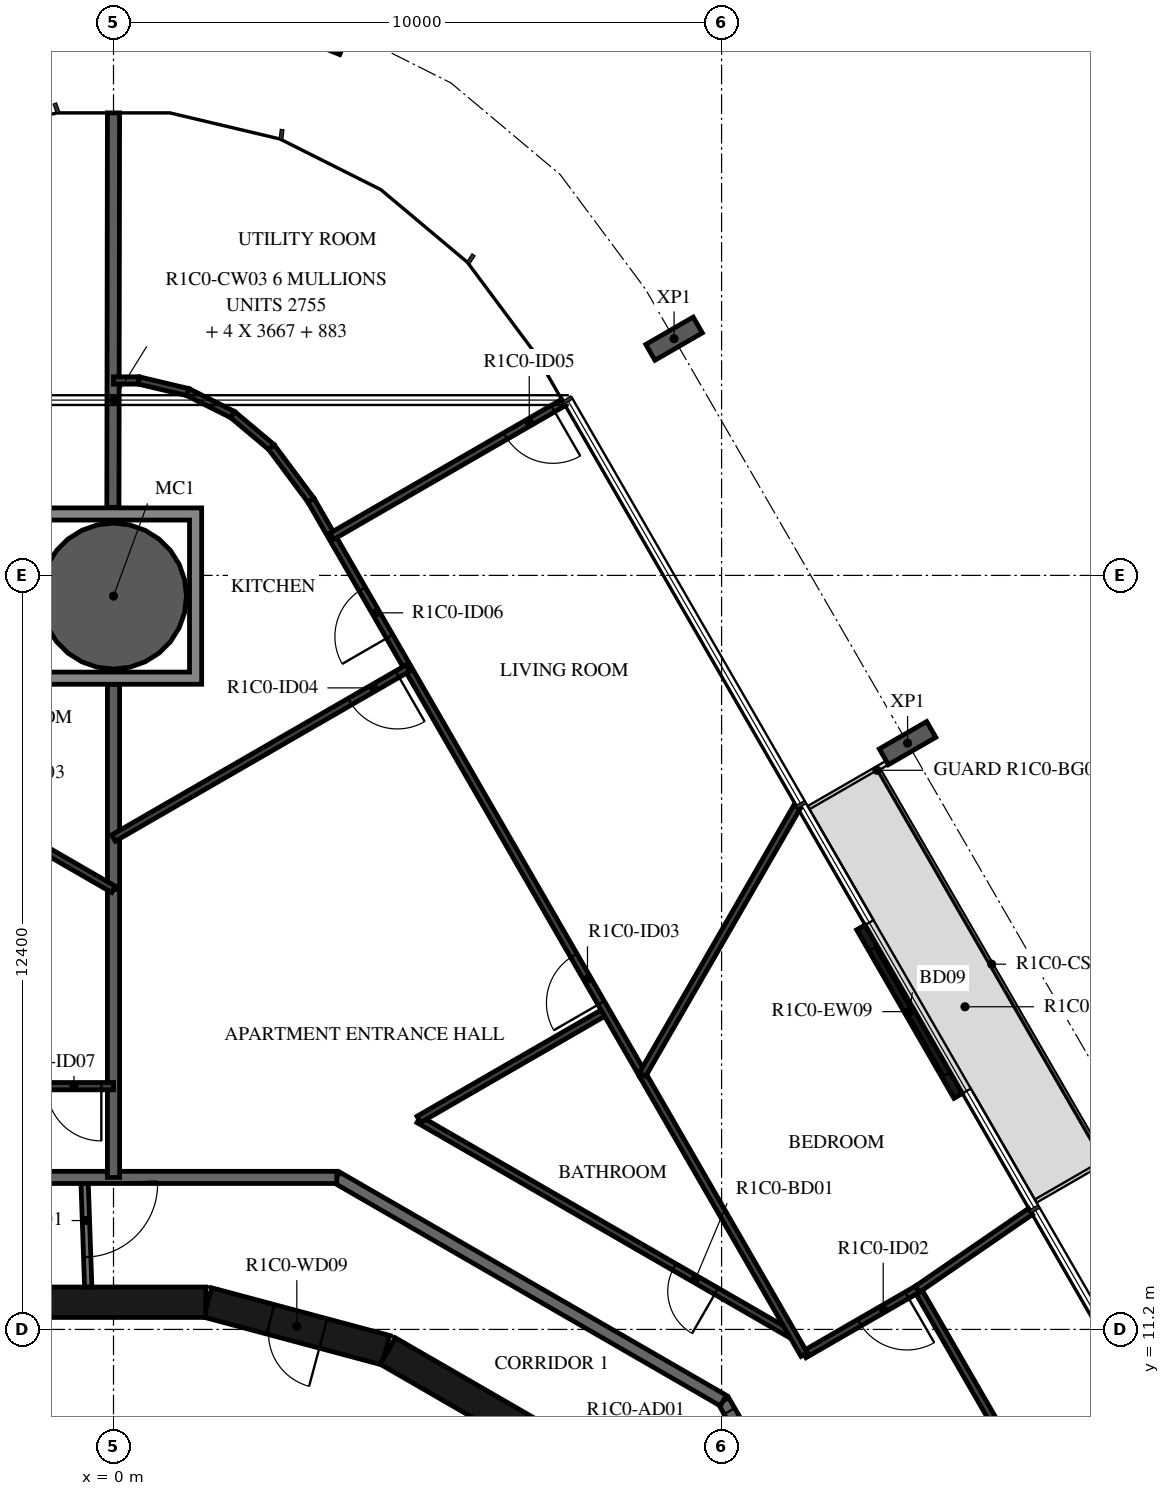
"""IFC4 building model, lengths in metres.
Left out: names, types, materials, properties, quantities, classifications, styles, units other than length and angle.
Written with IfcOpenShell. Run it as: python <this file> out.ifc"""

import sys

from ifc_helpers import new_model, si_unit, direction, frame, frame_2d, origin, origin_2d, place, context, subcontext, project, spatial, polyline, rectangle, hollow_circle, i_section, outline, extrude, element, fill, save


model = new_model("IFC4")
c1 = context("Model", 3, precision=1e-05, world=origin(), true_north=direction((0.0, 1.0)))
c2 = subcontext(c1, "Body", "Model", "MODEL_VIEW")
j1 = project(units=[si_unit("LENGTHUNIT", "METRE"), si_unit("PLANEANGLEUNIT", "RADIAN")], contexts=[c1])
p1 = place(None, origin())
s1 = spatial("IfcSite", under=j1, at=p1, CompositionType="ELEMENT")
p2 = place(p1, origin())
s2 = spatial("IfcBuilding", under=s1, at=p2, CompositionType="ELEMENT")
p3 = place(p2, frame((0.0, 0.0, 59.4)))
s3 = spatial("IfcBuildingStorey", under=s2, at=p3, CompositionType="ELEMENT", Elevation=59.4)
p4 = place(p3, frame((0.0, 23.26, -0.38), z_axis=(0.0, 0.0, 1.0), x_axis=(1.0, 0.0, 0.0)))
e1 = element("IfcColumn", 1, at=p4, inside=s3, PredefinedType="COLUMN", context=c2, shape_type="SweptSolid", body=[
    extrude(hollow_circle(Radius=1.2, WallThickness=0.06, at=origin_2d()), origin(), (0.0, 0.0, 1.0), 3.5),
])
for number, where, z_axis, x_axis in (
    (2, (13.059, 20.842, -0.38), (0.0, 0.0, 1.0), (0.5, -0.866, 0.0)),
    (3, (9.219, 27.493, -0.38), (0.0, 0.0, 1.0), (0.5, -0.866, 0.0)),
    (4, (3.748, 32.639, -0.38), (0.0, 0.0, 1.0), (0.929, -0.371, 0.0)),
):
    element("IfcColumn", number, at=place(p3, frame(where, z_axis=z_axis, x_axis=x_axis)), inside=s3, PredefinedType="COLUMN", context=c2, shape_type="SweptSolid", body=[
        extrude(i_section(OverallWidth=0.3, OverallDepth=0.9, WebThickness=0.019, FlangeThickness=0.035, FilletRadius=0.03, at=origin_2d()), origin(), (0.0, 0.0, 1.0), 3.5),
    ])
p5 = place(p3, frame((13.891, 15.041, 0.0), z_axis=(0.0, 0.0, 1.0), x_axis=(-0.499971222258, 0.866042017984, 0.0)))
e5 = element("IfcWall", 5, at=p5, inside=s3, PredefinedType="STANDARD", context=c2, shape_type="SweptSolid", body=[
    extrude(rectangle(XDim=3.2, YDim=0.16, at=frame_2d((1.6, 0.0))), origin(), (0.0, 0.0, 1.0), 3.12),
])
p6 = place(p5, frame((0.4, 0.0, 0.0)))
e6 = element("IfcOpeningElement", 6, at=p6, cuts=e5, PredefinedType="OPENING", context=c2, shape_type="SweptSolid", body=[
    extrude(rectangle(XDim=2.4, YDim=2.4, at=frame_2d((1.2, 1.2))), frame((0.0, 0.09, 0.0), z_axis=(0.0, -1.0, 0.0), x_axis=(1.0, 0.0, 0.0)), (0.0, 0.0, 1.0), 0.18),
])
p7 = place(p3, frame((7.137, 9.329, 0.0), z_axis=(0.0, 0.0, 1.0), x_axis=(-0.865975092491, 0.500087131594, 0.0)))
e7 = element("IfcWall", 7, at=p7, inside=s3, PredefinedType="SHEAR", context=c2, shape_type="SweptSolid", body=[
    extrude(rectangle(XDim=3.033, YDim=0.5, at=frame_2d((1.516, 0.0))), origin(), (0.0, 0.0, 1.0), 3.12),
])
p8 = place(p3, frame((4.479, 10.858, 0.0), z_axis=(0.0, 0.0, 1.0), x_axis=(-0.965948410781, 0.258734743916, 0.0)))
e8 = element("IfcWall", 8, at=p8, inside=s3, PredefinedType="SHEAR", context=c2, shape_type="SweptSolid", body=[
    extrude(rectangle(XDim=3.033, YDim=0.5, at=frame_2d((1.516, 0.0))), origin(), (0.0, 0.0, 1.0), 3.12),
])
p9 = place(p8, frame((1.066, 0.0, 0.0)))
e9 = element("IfcOpeningElement", 9, at=p9, cuts=e8, PredefinedType="OPENING", context=c2, shape_type="SweptSolid", body=[
    extrude(rectangle(XDim=0.9, YDim=2.1, at=frame_2d((0.45, 1.05))), frame((0.0, 0.26, 0.0), z_axis=(0.0, -1.0, 0.0), x_axis=(1.0, 0.0, 0.0)), (0.0, 0.0, 1.0), 0.52),
])
p10 = place(p3, frame((1.516, 11.647, 0.0), z_axis=(0.0, 0.0, 1.0), x_axis=(-1.0, 0.0, 0.0)))
e10 = element("IfcWall", 10, at=p10, inside=s3, PredefinedType="SHEAR", context=c2, shape_type="SweptSolid", body=[
    extrude(rectangle(XDim=3.033, YDim=0.5, at=frame_2d((1.516, 0.0))), origin(), (0.0, 0.0, 1.0), 3.12),
])
p11 = place(p3, frame((-0.479, 13.7, 0.0), z_axis=(0.0, 0.0, 1.0), x_axis=(0.034919103017, -0.999390142159, 0.0)))
e11 = element("IfcWall", 11, at=p11, inside=s3, PredefinedType="PARTITIONING", context=c2, shape_type="SweptSolid", body=[
    extrude(rectangle(XDim=1.804, YDim=0.12, at=frame_2d((0.902, 0.0))), origin(), (0.0, 0.0, 1.0), 3.12),
])
p12 = place(p11, frame((0.11, 0.0, 0.0)))
e12 = element("IfcOpeningElement", 12, at=p12, cuts=e11, PredefinedType="OPENING", context=c2, shape_type="SweptSolid", body=[
    extrude(rectangle(XDim=1.2, YDim=2.1, at=frame_2d((0.6, 1.05))), frame((0.0, 0.07, 0.0), z_axis=(0.0, -1.0, 0.0), x_axis=(1.0, 0.0, 0.0)), (0.0, 0.0, 1.0), 0.14),
])
p13 = place(p3, frame((13.7, 3.671, 0.0), z_axis=(0.0, 0.0, 1.0), x_axis=(-0.500001669485, 0.866024439905, 0.0)))
e13 = element("IfcWall", 13, at=p13, inside=s3, PredefinedType="STANDARD", context=c2, shape_type="SweptSolid", body=[
    extrude(rectangle(XDim=7.342, YDim=0.2, at=frame_2d((3.671, 0.0))), origin(), (0.0, 0.0, 1.0), 3.12),
])
p14 = place(p13, frame((6.142, 0.0, 0.0)))
e14 = element("IfcOpeningElement", 14, at=p14, cuts=e13, PredefinedType="OPENING", context=c2, shape_type="SweptSolid", body=[
    extrude(rectangle(XDim=1.0, YDim=2.1, at=frame_2d((0.5, 1.05))), frame((0.0, 0.11, 0.0), z_axis=(0.0, -1.0, 0.0), x_axis=(1.0, 0.0, 0.0)), (0.0, 0.0, 1.0), 0.22),
])
for number, where, z_axis, x_axis in (
    (15, (10.029, 10.029, 0.0), (0.0, 0.0, 1.0), (-0.866, 0.5, 0.0)),
    (16, (3.671, 13.7, 0.0), (0.0, 0.0, 1.0), (-1.0, 0.0, 0.0)),
):
    element("IfcWall", number, at=place(p3, frame(where, z_axis=z_axis, x_axis=x_axis)), inside=s3, PredefinedType="STANDARD", context=c2, shape_type="SweptSolid", body=[
        extrude(rectangle(XDim=7.342, YDim=0.2, at=frame_2d((3.671, 0.0))), origin(), (0.0, 0.0, 1.0), 3.12),
    ])
p15 = place(p3, frame((0.0, 18.437, 0.0), z_axis=(0.0, 0.0, 1.0), x_axis=(0.0, -1.0, 0.0)))
e17 = element("IfcWall", 17, at=p15, inside=s3, PredefinedType="STANDARD", context=c2, shape_type="SweptSolid", body=[
    extrude(rectangle(XDim=4.737, YDim=0.2, at=frame_2d((2.368, 0.0))), origin(), (0.0, 0.0, 1.0), 3.12),
])
p16 = place(p3, frame((0.0, 21.81, 0.0), z_axis=(0.0, 0.0, 1.0), x_axis=(0.0, -1.0, 0.0)))
e18 = element("IfcWall", 18, at=p16, inside=s3, PredefinedType="STANDARD", context=c2, shape_type="SweptSolid", body=[
    extrude(rectangle(XDim=3.373, YDim=0.2, at=frame_2d((1.687, 0.0))), origin(), (0.0, 0.0, 1.0), 3.12),
])
p17 = place(p3, frame((0.0, 31.206, 0.0), z_axis=(0.0, 0.0, 1.0), x_axis=(-0.001543266126, -0.999998809164, 0.0)))
e19 = element("IfcWall", 19, at=p17, inside=s3, PredefinedType="STANDARD", context=c2, shape_type="SweptSolid", body=[
    extrude(rectangle(XDim=6.486, YDim=0.2, at=frame_2d((3.243, 0.0))), origin(), (0.0, 0.0, 1.0), 3.12),
])
p18 = place(p3, frame((14.471, 9.697, 0.0), z_axis=(0.0, 0.0, 1.0), x_axis=(-0.500004234368, 0.866022959057, 0.0)))
e20 = element("IfcWall", 20, at=p18, inside=s3, PredefinedType="PARTITIONING", context=c2, shape_type="SweptSolid", body=[
    extrude(rectangle(XDim=2.5, YDim=0.12, at=frame_2d((1.25, 0.0))), origin(), (0.0, 0.0, 1.0), 3.12),
])
p19 = place(p3, frame((13.221, 11.862, 0.0), z_axis=(0.0, 0.0, 1.0), x_axis=(-0.866055151781, -0.499948471418, 0.0)))
e21 = element("IfcWall", 21, at=p19, inside=s3, PredefinedType="PARTITIONING", context=c2, shape_type="SweptSolid", body=[
    extrude(rectangle(XDim=2.151, YDim=0.12, at=frame_2d((1.075, 0.0))), origin(), (0.0, 0.0, 1.0), 3.12),
])
p20 = place(p19, frame((0.2, 0.0, 0.0)))
e22 = element("IfcOpeningElement", 22, at=p20, cuts=e21, PredefinedType="OPENING", context=c2, shape_type="SweptSolid", body=[
    extrude(rectangle(XDim=0.9, YDim=2.1, at=frame_2d((0.45, 1.05))), frame((0.0, 0.07, 0.0), z_axis=(0.0, -1.0, 0.0), x_axis=(1.0, 0.0, 0.0)), (0.0, 0.0, 1.0), 0.14),
])
p21 = place(p3, frame((11.127, 11.127, 0.0), z_axis=(0.0, 0.0, 1.0), x_axis=(-0.86602299963, 0.500004164094, 0.0)))
e23 = element("IfcWall", 23, at=p21, inside=s3, PredefinedType="PARTITIONING", context=c2, shape_type="SweptSolid", body=[
    extrude(rectangle(XDim=7.052, YDim=0.12, at=frame_2d((3.526, 0.0))), origin(), (0.0, 0.0, 1.0), 3.12),
])
p22 = place(p21, frame((1.4, 0.0, 0.0)))
e24 = element("IfcOpeningElement", 24, at=p22, cuts=e23, PredefinedType="OPENING", context=c2, shape_type="SweptSolid", body=[
    extrude(rectangle(XDim=0.8, YDim=2.1, at=frame_2d((0.4, 1.05))), frame((0.0, 0.07, 0.0), z_axis=(0.0, -1.0, 0.0), x_axis=(1.0, 0.0, 0.0)), (0.0, 0.0, 1.0), 0.14),
])
p23 = place(p3, frame((5.02, 14.653, 0.0), z_axis=(0.0, 0.0, 1.0), x_axis=(0.866028940167, 0.499993874756, 0.0)))
e25 = element("IfcWall", 25, at=p23, inside=s3, PredefinedType="PARTITIONING", context=c2, shape_type="SweptSolid", body=[
    extrude(rectangle(XDim=3.556, YDim=0.12, at=frame_2d((1.778, 0.0))), origin(), (0.0, 0.0, 1.0), 3.12),
])
p24 = place(p3, frame((8.7, 15.392, 0.0), z_axis=(0.0, 0.0, 1.0), x_axis=(-0.500002742713, 0.866023820272, 0.0)))
e26 = element("IfcWall", 26, at=p24, inside=s3, PredefinedType="PARTITIONING", context=c2, shape_type="SweptSolid", body=[
    extrude(rectangle(XDim=10.908, YDim=0.12, at=frame_2d((5.454, 0.0))), origin(), (0.0, 0.0, 1.0), 3.12),
])
p25 = place(p24, frame((1.36, 0.0, 0.0)))
e27 = element("IfcOpeningElement", 27, at=p25, cuts=e26, PredefinedType="OPENING", context=c2, shape_type="SweptSolid", body=[
    extrude(rectangle(XDim=0.9, YDim=2.1, at=frame_2d((0.45, 1.05))), frame((0.0, 0.07, 0.0), z_axis=(0.0, -1.0, 0.0), x_axis=(1.0, 0.0, 0.0)), (0.0, 0.0, 1.0), 0.14),
])
p26 = place(p24, frame((8.317, 0.0, 0.0)))
e28 = element("IfcOpeningElement", 28, at=p26, cuts=e26, PredefinedType="OPENING", context=c2, shape_type="SweptSolid", body=[
    extrude(rectangle(XDim=0.9, YDim=2.1, at=frame_2d((0.45, 1.05))), frame((0.0, 0.07, 0.0), z_axis=(0.0, -1.0, 0.0), x_axis=(1.0, 0.0, 0.0)), (0.0, 0.0, 1.0), 0.14),
])
p27 = place(p3, frame((4.841, 22.075, 0.0), z_axis=(0.0, 0.0, 1.0), x_axis=(-0.866019751484, -0.500009789943, 0.0)))
e29 = element("IfcWall", 29, at=p27, inside=s3, PredefinedType="PARTITIONING", context=c2, shape_type="SweptSolid", body=[
    extrude(rectangle(XDim=5.59, YDim=0.12, at=frame_2d((2.795, 0.0))), origin(), (0.0, 0.0, 1.0), 3.12),
])
p28 = place(p27, frame((0.2, 0.0, 0.0)))
e30 = element("IfcOpeningElement", 30, at=p28, cuts=e29, PredefinedType="OPENING", context=c2, shape_type="SweptSolid", body=[
    extrude(rectangle(XDim=0.9, YDim=2.1, at=frame_2d((0.45, 1.05))), frame((0.0, 0.07, 0.0), z_axis=(0.0, -1.0, 0.0), x_axis=(1.0, 0.0, 0.0)), (0.0, 0.0, 1.0), 0.14),
])
p29 = place(p3, frame((15.08, 13.14, 0.0), z_axis=(0.0, 0.0, 1.0), x_axis=(-0.824041924199, -0.566528822887, 0.0)))
e31 = element("IfcWall", 31, at=p29, inside=s3, PredefinedType="PARTITIONING", context=c2, shape_type="SweptSolid", body=[
    extrude(rectangle(XDim=2.256, YDim=0.12, at=frame_2d((1.128, 0.0))), origin(), (0.0, 0.0, 1.0), 2.73),
])
p30 = place(p3, frame((8.7, 15.392, 0.0), z_axis=(0.0, 0.0, 1.0), x_axis=(0.499986106925, -0.866033424806, 0.0)))
e32 = element("IfcWall", 32, at=p30, inside=s3, PredefinedType="PARTITIONING", context=c2, shape_type="SweptSolid", body=[
    extrude(rectangle(XDim=5.317, YDim=0.12, at=frame_2d((2.659, 0.0))), origin(), (0.0, 0.0, 1.0), 3.12),
])
p31 = place(p3, frame((11.24, 19.792, 0.0), z_axis=(0.0, 0.0, 1.0), x_axis=(-0.499978956711, -0.866037552792, 0.0)))
e33 = element("IfcWall", 33, at=p31, inside=s3, PredefinedType="PARTITIONING", context=c2, shape_type="SweptSolid", body=[
    extrude(rectangle(XDim=5.081, YDim=0.12, at=frame_2d((2.541, 0.0))), origin(), (0.0, 0.0, 1.0), 3.12),
])
p32 = place(p3, frame((7.4, 26.443, 0.0), z_axis=(0.0, 0.0, 1.0), x_axis=(-0.866032203192, -0.499988222896, 0.0)))
e34 = element("IfcWall", 34, at=p32, inside=s3, PredefinedType="PARTITIONING", context=c2, shape_type="SweptSolid", body=[
    extrude(rectangle(XDim=4.4, YDim=0.12, at=frame_2d((2.2, 0.0))), origin(), (0.0, 0.0, 1.0), 2.73),
])
p33 = place(p32, frame((0.2, 0.0, 0.0)))
e35 = element("IfcOpeningElement", 35, at=p33, cuts=e34, PredefinedType="OPENING", context=c2, shape_type="SweptSolid", body=[
    extrude(rectangle(XDim=0.9, YDim=2.1, at=frame_2d((0.45, 1.05))), frame((0.0, 0.07, 0.0), z_axis=(0.0, -1.0, 0.0), x_axis=(1.0, 0.0, 0.0)), (0.0, 0.0, 1.0), 0.14),
])
p34 = place(p3, frame((0.0, 26.806, 0.0), z_axis=(0.0, 0.0, 1.0), x_axis=(1.0, 0.0, 0.0)))
e36 = element("IfcWall", 36, at=p34, inside=s3, PredefinedType="PARTITIONING", context=c2, shape_type="SweptSolid", body=[
    extrude(rectangle(XDim=0.415, YDim=0.12, at=frame_2d((0.207, 0.0))), origin(), (0.0, 0.0, 1.0), 3.12),
])
p35 = place(p3, frame((0.415, 26.806, 0.0), z_axis=(0.0, 0.0, 1.0), x_axis=(0.973048993259, -0.230598475097, 0.0)))
e37 = element("IfcWall", 37, at=p35, inside=s3, PredefinedType="PARTITIONING", context=c2, shape_type="SweptSolid", body=[
    extrude(rectangle(XDim=0.829, YDim=0.12, at=frame_2d((0.415, 0.0))), origin(), (0.0, 0.0, 1.0), 3.12),
])
for number, where, z_axis, x_axis in (
    (38, (1.221, 26.615, 0.0), (0.0, 0.0, 1.0), (0.894, -0.449, 0.0)),
    (39, (1.962, 26.243, 0.0), (0.0, 0.0, 1.0), (0.766, -0.643, 0.0)),
):
    element("IfcWall", number, at=place(p3, frame(where, z_axis=z_axis, x_axis=x_axis)), inside=s3, PredefinedType="PARTITIONING", context=c2, shape_type="SweptSolid", body=[
        extrude(rectangle(XDim=0.829, YDim=0.12, at=frame_2d((0.415, 0.0))), origin(), (0.0, 0.0, 1.0), 3.12),
    ])
p36 = place(p3, frame((2.597, 25.71, 0.0), z_axis=(0.0, 0.0, 1.0), x_axis=(0.59722925597, -0.802070580319, 0.0)))
e40 = element("IfcWall", 40, at=p36, inside=s3, PredefinedType="PARTITIONING", context=c2, shape_type="SweptSolid", body=[
    extrude(rectangle(XDim=1.087, YDim=0.12, at=frame_2d((0.543, 0.0))), origin(), (0.0, 0.0, 1.0), 3.12),
])
p37 = place(p3, frame((0.0, 15.2, 0.0), z_axis=(0.0, 0.0, 1.0), x_axis=(-1.0, 0.0, 0.0)))
e41 = element("IfcWall", 41, at=p37, inside=s3, PredefinedType="PARTITIONING", context=c2, shape_type="SweptSolid", body=[
    extrude(rectangle(XDim=4.073, YDim=0.12, at=frame_2d((2.036, 0.0))), origin(), (0.0, 0.0, 1.0), 3.12),
])
p38 = place(p37, frame((0.2, 0.0, 0.0)))
e42 = element("IfcOpeningElement", 42, at=p38, cuts=e41, PredefinedType="OPENING", context=c2, shape_type="SweptSolid", body=[
    extrude(rectangle(XDim=0.9, YDim=2.1, at=frame_2d((0.45, 1.05))), frame((0.0, 0.07, 0.0), z_axis=(0.0, -1.0, 0.0), x_axis=(1.0, 0.0, 0.0)), (0.0, 0.0, 1.0), 0.14),
])
p39 = place(p3, frame((-3.821, 20.643, 0.0), z_axis=(0.0, 0.0, 1.0), x_axis=(0.866024310165, -0.5000018942, 0.0)))
e43 = element("IfcWall", 43, at=p39, inside=s3, PredefinedType="PARTITIONING", context=c2, shape_type="SweptSolid", body=[
    extrude(rectangle(XDim=4.412, YDim=0.12, at=frame_2d((2.206, 0.0))), origin(), (0.0, 0.0, 1.0), 3.12),
])
p40 = place(p39, frame((0.2, 0.0, 0.0)))
e44 = element("IfcOpeningElement", 44, at=p40, cuts=e43, PredefinedType="OPENING", context=c2, shape_type="SweptSolid", body=[
    extrude(rectangle(XDim=0.8, YDim=2.1, at=frame_2d((0.4, 1.05))), frame((0.0, 0.07, 0.0), z_axis=(0.0, -1.0, 0.0), x_axis=(1.0, 0.0, 0.0)), (0.0, 0.0, 1.0), 0.14),
])
p41 = place(p3, origin())
e45 = element("IfcWall", 45, at=p41, inside=s3, PredefinedType="STANDARD", context=c2, shape_type="SweptSolid", body=[
    extrude(outline(polyline([(1.45, 24.71), (1.45, 21.81), (-1.45, 21.81), (-1.45, 24.71), (1.45, 24.71)]), holes=[polyline([(-1.25, 22.01), (1.25, 22.01), (1.25, 24.51), (-1.25, 24.51), (-1.25, 22.01)])]), origin(), (0.0, 0.0, 1.0), 3.12),
])
p42 = place(p6, origin())
e46 = element("IfcDoor", 46, at=p42, inside=s3, OperationType="DOUBLE_DOOR_SLIDING", PredefinedType="DOOR", context=c2, shape_type="SweptSolid", body=[
    extrude(rectangle(XDim=2.4, YDim=2.4, at=frame_2d((1.2, 1.2))), frame((0.0, 0.025, 0.0), z_axis=(0.0, -1.0, 0.0), x_axis=(1.0, 0.0, 0.0)), (0.0, 0.0, 1.0), 0.05),
])
fill(e6, e46)
p43 = place(p9, origin())
e47 = element("IfcDoor", 47, at=p43, inside=s3, OperationType="SINGLE_SWING_RIGHT", PredefinedType="DOOR", context=c2, shape_type="SweptSolid", body=[
    extrude(rectangle(XDim=0.9, YDim=2.1, at=frame_2d((0.45, 1.05))), frame((0.0, 0.025, 0.0), z_axis=(0.0, -1.0, 0.0), x_axis=(1.0, 0.0, 0.0)), (0.0, 0.0, 1.0), 0.05),
])
fill(e9, e47)
p44 = place(p14, origin())
e48 = element("IfcDoor", 48, at=p44, inside=s3, OperationType="SINGLE_SWING_RIGHT", PredefinedType="DOOR", context=c2, shape_type="SweptSolid", body=[
    extrude(rectangle(XDim=1.0, YDim=2.1, at=frame_2d((0.5, 1.05))), frame((0.0, 0.025, 0.0), z_axis=(0.0, -1.0, 0.0), x_axis=(1.0, 0.0, 0.0)), (0.0, 0.0, 1.0), 0.05),
])
fill(e14, e48)
p45 = place(p20, origin())
e49 = element("IfcDoor", 49, at=p45, inside=s3, OperationType="SINGLE_SWING_RIGHT", PredefinedType="DOOR", context=c2, shape_type="SweptSolid", body=[
    extrude(rectangle(XDim=0.9, YDim=2.1, at=frame_2d((0.45, 1.05))), frame((0.0, 0.025, 0.0), z_axis=(0.0, -1.0, 0.0), x_axis=(1.0, 0.0, 0.0)), (0.0, 0.0, 1.0), 0.05),
])
fill(e22, e49)
p46 = place(p22, origin())
e50 = element("IfcDoor", 50, at=p46, inside=s3, OperationType="SINGLE_SWING_RIGHT", PredefinedType="DOOR", context=c2, shape_type="SweptSolid", body=[
    extrude(rectangle(XDim=0.8, YDim=2.1, at=frame_2d((0.4, 1.05))), frame((0.0, 0.025, 0.0), z_axis=(0.0, -1.0, 0.0), x_axis=(1.0, 0.0, 0.0)), (0.0, 0.0, 1.0), 0.05),
])
fill(e24, e50)
p47 = place(p25, origin())
e51 = element("IfcDoor", 51, at=p47, inside=s3, OperationType="SINGLE_SWING_RIGHT", PredefinedType="DOOR", context=c2, shape_type="SweptSolid", body=[
    extrude(rectangle(XDim=0.9, YDim=2.1, at=frame_2d((0.45, 1.05))), frame((0.0, 0.025, 0.0), z_axis=(0.0, -1.0, 0.0), x_axis=(1.0, 0.0, 0.0)), (0.0, 0.0, 1.0), 0.05),
])
fill(e27, e51)
p48 = place(p28, origin())
e52 = element("IfcDoor", 52, at=p48, inside=s3, OperationType="SINGLE_SWING_RIGHT", PredefinedType="DOOR", context=c2, shape_type="SweptSolid", body=[
    extrude(rectangle(XDim=0.9, YDim=2.1, at=frame_2d((0.45, 1.05))), frame((0.0, 0.025, 0.0), z_axis=(0.0, -1.0, 0.0), x_axis=(1.0, 0.0, 0.0)), (0.0, 0.0, 1.0), 0.05),
])
fill(e30, e52)
p49 = place(p33, origin())
e53 = element("IfcDoor", 53, at=p49, inside=s3, OperationType="SINGLE_SWING_RIGHT", PredefinedType="DOOR", context=c2, shape_type="SweptSolid", body=[
    extrude(rectangle(XDim=0.9, YDim=2.1, at=frame_2d((0.45, 1.05))), frame((0.0, 0.025, 0.0), z_axis=(0.0, -1.0, 0.0), x_axis=(1.0, 0.0, 0.0)), (0.0, 0.0, 1.0), 0.05),
])
fill(e35, e53)
p50 = place(p26, origin())
e54 = element("IfcDoor", 54, at=p50, inside=s3, OperationType="SINGLE_SWING_LEFT", PredefinedType="DOOR", context=c2, shape_type="SweptSolid", body=[
    extrude(rectangle(XDim=0.9, YDim=2.1, at=frame_2d((0.45, 1.05))), frame((0.0, 0.025, 0.0), z_axis=(0.0, -1.0, 0.0), x_axis=(1.0, 0.0, 0.0)), (0.0, 0.0, 1.0), 0.05),
])
fill(e28, e54)
p51 = place(p38, origin())
e55 = element("IfcDoor", 55, at=p51, inside=s3, OperationType="SINGLE_SWING_RIGHT", PredefinedType="DOOR", context=c2, shape_type="SweptSolid", body=[
    extrude(rectangle(XDim=0.9, YDim=2.1, at=frame_2d((0.45, 1.05))), frame((0.0, 0.025, 0.0), z_axis=(0.0, -1.0, 0.0), x_axis=(1.0, 0.0, 0.0)), (0.0, 0.0, 1.0), 0.05),
])
fill(e42, e55)
p52 = place(p12, origin())
e56 = element("IfcDoor", 56, at=p52, inside=s3, OperationType="DOUBLE_DOOR_SINGLE_SWING", PredefinedType="DOOR", context=c2, shape_type="SweptSolid", body=[
    extrude(rectangle(XDim=1.2, YDim=2.1, at=frame_2d((0.6, 1.05))), frame((0.0, 0.025, 0.0), z_axis=(0.0, -1.0, 0.0), x_axis=(1.0, 0.0, 0.0)), (0.0, 0.0, 1.0), 0.05),
])
fill(e12, e56)
save(model, sys.argv[1])
